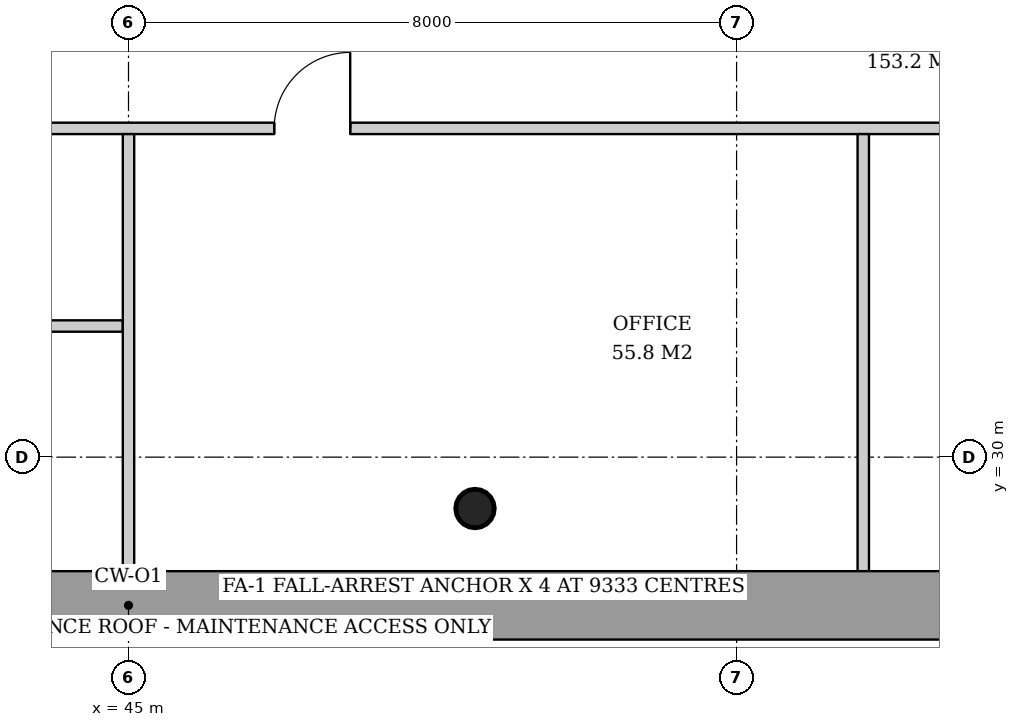
"""IFC4 building model, lengths in metres.
Left out: names, types, materials, properties, quantities, classifications, styles, units other than length and angle.
Written with IfcOpenShell. Run it as: python <this file> out.ifc"""

import sys

from ifc_helpers import new_model, si_unit, direction, frame, frame_2d, origin, origin_2d, place, context, subcontext, project, spatial, rectangle, hollow_circle, extrude, element, fill, save


model = new_model("IFC4")
c1 = context("Model", 3, precision=1e-05, world=origin(), true_north=direction((0.0, 1.0)))
c2 = subcontext(c1, "Body", "Model", "MODEL_VIEW")
j1 = project(units=[si_unit("LENGTHUNIT", "METRE"), si_unit("PLANEANGLEUNIT", "RADIAN")], contexts=[c1])
p1 = place(None, origin())
s1 = spatial("IfcSite", under=j1, at=p1, CompositionType="ELEMENT")
p2 = place(p1, origin())
s2 = spatial("IfcBuilding", under=s1, at=p2, CompositionType="ELEMENT")
p3 = place(p2, frame((0.0, 0.0, 249.0)))
s3 = spatial("IfcBuildingStorey", under=s2, at=p3, CompositionType="ELEMENT", Elevation=249.0)
p4 = place(p3, frame((49.572, 29.286, 0.0), z_axis=(-0.010658893366, 0.031976680097, 0.999431778523), x_axis=(-0.948683298051, -0.316227766017, 0.0)))
e1 = element("IfcColumn", 1, at=p4, inside=s3, PredefinedType="COLUMN", context=c2, shape_type="SweptSolid", body=[
    extrude(hollow_circle(Radius=0.254, WallThickness=0.02, at=origin_2d()), origin(), (0.0, 0.0, 1.0), 3.802),
])
p5 = place(p3, frame((40.242, 31.725, 0.0), z_axis=(0.0, 0.0, 1.0), x_axis=(1.0, 0.0, 0.0)))
e2 = element("IfcWall", 2, at=p5, inside=s3, PredefinedType="PARTITIONING", context=c2, shape_type="SweptSolid", body=[
    extrude(rectangle(XDim=4.683, YDim=0.15, at=frame_2d((2.342, 0.0))), origin(), (0.0, 0.0, 1.0), 3.12),
])
p6 = place(p3, frame((32.684, 34.325, 0.0), z_axis=(0.0, 0.0, 1.0), x_axis=(1.0, 0.0, 0.0)))
e3 = element("IfcWall", 3, at=p6, inside=s3, PredefinedType="PARTITIONING", context=c2, shape_type="SweptSolid", body=[
    extrude(rectangle(XDim=24.633, YDim=0.15, at=frame_2d((12.316, 0.0))), origin(), (0.0, 0.0, 1.0), 3.02),
])
p7 = place(p6, frame((4.566, 0.0, 0.0)))
e4 = element("IfcOpeningElement", 4, at=p7, cuts=e3, PredefinedType="OPENING", context=c2, shape_type="SweptSolid", body=[
    extrude(rectangle(XDim=1.0, YDim=2.1, at=frame_2d((0.5, 1.05))), frame((0.0, 0.085, 0.0), z_axis=(0.0, -1.0, 0.0), x_axis=(1.0, 0.0, 0.0)), (0.0, 0.0, 1.0), 0.17),
])
p8 = place(p6, frame((9.4, 0.0, 0.0)))
e5 = element("IfcOpeningElement", 5, at=p8, cuts=e3, PredefinedType="OPENING", context=c2, shape_type="SweptSolid", body=[
    extrude(rectangle(XDim=1.0, YDim=2.1, at=frame_2d((0.5, 1.05))), frame((0.0, 0.085, 0.0), z_axis=(0.0, -1.0, 0.0), x_axis=(1.0, 0.0, 0.0)), (0.0, 0.0, 1.0), 0.17),
])
p9 = place(p6, frame((14.233, 0.0, 0.0)))
e6 = element("IfcOpeningElement", 6, at=p9, cuts=e3, PredefinedType="OPENING", context=c2, shape_type="SweptSolid", body=[
    extrude(rectangle(XDim=1.0, YDim=2.1, at=frame_2d((0.5, 1.05))), frame((0.0, 0.085, 0.0), z_axis=(0.0, -1.0, 0.0), x_axis=(1.0, 0.0, 0.0)), (0.0, 0.0, 1.0), 0.17),
])
for number, where, z_axis, x_axis in (
    (7, (45.0, 34.25, 0.0), (0.0, 0.0, 1.0), (0.0, -1.0, 0.0)),
    (8, (54.667, 34.25, 0.0), (0.0, 0.0, 1.0), (0.0, -1.0, 0.0)),
):
    element("IfcWall", number, at=place(p3, frame(where, z_axis=z_axis, x_axis=x_axis)), inside=s3, PredefinedType="PARTITIONING", context=c2, shape_type="SweptSolid", body=[
        extrude(rectangle(XDim=5.79, YDim=0.15, at=frame_2d((2.895, 0.0))), origin(), (0.0, 0.0, 1.0), 3.12),
    ])
p10 = place(p9, origin())
e9 = element("IfcDoor", 9, at=p10, inside=s3, OperationType="SINGLE_SWING_RIGHT", PredefinedType="DOOR", context=c2, shape_type="SweptSolid", body=[
    extrude(rectangle(XDim=1.0, YDim=2.1, at=frame_2d((0.5, 1.05))), frame((0.0, 0.025, 0.0), z_axis=(0.0, -1.0, 0.0), x_axis=(1.0, 0.0, 0.0)), (0.0, 0.0, 1.0), 0.05),
])
fill(e6, e9)
save(model, sys.argv[1])
